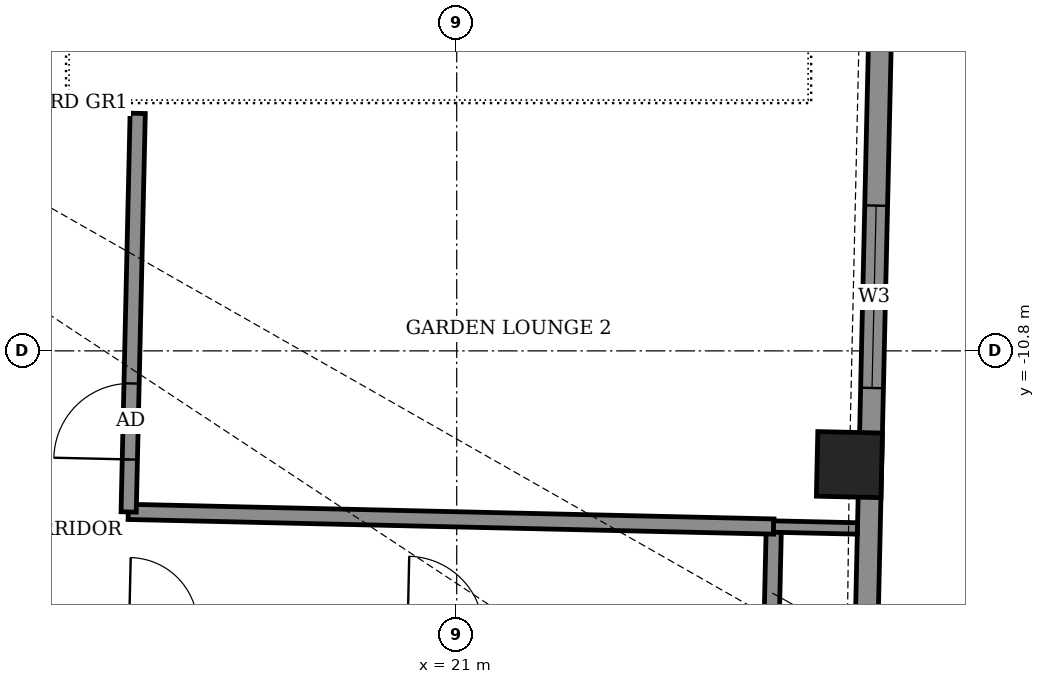
"""IFC4 building model, lengths in metres.
Left out: names, types, materials, properties, quantities, classifications, styles, units other than length and angle.
Written with IfcOpenShell. Run it as: python <this file> out.ifc"""

import sys

from ifc_helpers import new_model, si_unit, direction, frame, frame_2d, origin, origin_2d, place, context, subcontext, project, spatial, rectangle, extrude, element, fill, save


model = new_model("IFC4")
c1 = context("Model", 3, precision=1e-05, world=origin(), true_north=direction((0.0, 1.0)))
c2 = subcontext(c1, "Body", "Model", "MODEL_VIEW")
j1 = project(units=[si_unit("LENGTHUNIT", "METRE"), si_unit("PLANEANGLEUNIT", "RADIAN")], contexts=[c1])
p1 = place(None, origin())
s1 = spatial("IfcSite", under=j1, at=p1, CompositionType="ELEMENT")
p2 = place(p1, origin())
s2 = spatial("IfcBuilding", under=s1, at=p2, CompositionType="ELEMENT")
p3 = place(p2, frame((0.0, 0.0, 337.9)))
s3 = spatial("IfcBuildingStorey", under=s2, at=p3, CompositionType="ELEMENT", Elevation=337.9)
p4 = place(p3, frame((26.166, -12.296, -0.55), z_axis=(0.0, 0.0, 1.0), x_axis=(0.022679062841, 0.999742796978, 0.0)))
e1 = element("IfcColumn", 1, at=p4, inside=s3, PredefinedType="COLUMN", context=c2, shape_type="SweptSolid", body=[
    extrude(rectangle(XDim=0.85, YDim=0.85, at=origin_2d()), origin(), (0.0, 0.0, 1.0), 4.6),
])
p5 = place(p3, frame((26.379, -15.039, 0.0), z_axis=(0.0, 0.0, 1.0), x_axis=(0.022668695782, 0.9997430321, 0.0)))
e2 = element("IfcWall", 2, at=p5, inside=s3, PredefinedType="SOLIDWALL", context=c2, shape_type="SweptSolid", body=[
    extrude(rectangle(XDim=9.574, YDim=0.3, at=frame_2d((4.787, 0.0))), origin(), (0.0, 0.0, 1.0), 2.75),
])
p6 = place(p5, frame((3.752, 0.0, 0.9)))
e3 = element("IfcOpeningElement", 3, at=p6, cuts=e2, PredefinedType="OPENING", context=c2, shape_type="SweptSolid", body=[
    extrude(rectangle(XDim=2.4, YDim=1.8, at=frame_2d((1.2, 0.9))), frame((0.0, 0.16, 0.0), z_axis=(0.0, -1.0, 0.0), x_axis=(1.0, 0.0, 0.0)), (0.0, 0.0, 1.0), 0.32),
])
p7 = place(p3, frame((-23.849, -13.499, 0.0), z_axis=(0.0, 0.0, 1.0), x_axis=(0.999742429398, -0.022695260756, 0.0)))
e4 = element("IfcWall", 4, at=p7, inside=s3, PredefinedType="PARTITIONING", context=c2, shape_type="SweptSolid", body=[
    extrude(rectangle(XDim=49.0, YDim=0.2, at=frame_2d((24.5, 0.0))), origin(), (0.0, 0.0, 1.0), 2.45),
])
p8 = place(p7, frame((7.55, 0.0, 0.0)))
e5 = element("IfcOpeningElement", 5, at=p8, cuts=e4, PredefinedType="OPENING", context=c2, shape_type="SweptSolid", body=[
    extrude(rectangle(XDim=0.9, YDim=2.1, at=frame_2d((0.45, 1.05))), frame((0.0, 0.11, 0.0), z_axis=(0.0, -1.0, 0.0), x_axis=(1.0, 0.0, 0.0)), (0.0, 0.0, 1.0), 0.22),
])
p9 = place(p7, frame((12.794, 0.0, 0.0)))
e6 = element("IfcOpeningElement", 6, at=p9, cuts=e4, PredefinedType="OPENING", context=c2, shape_type="SweptSolid", body=[
    extrude(rectangle(XDim=1.0, YDim=2.1, at=frame_2d((0.5, 1.05))), frame((0.0, 0.11, 0.0), z_axis=(0.0, -1.0, 0.0), x_axis=(1.0, 0.0, 0.0)), (0.0, 0.0, 1.0), 0.22),
])
p10 = place(p7, frame((9.95, 0.0, 0.0)))
e7 = element("IfcOpeningElement", 7, at=p10, cuts=e4, PredefinedType="OPENING", context=c2, shape_type="SweptSolid", body=[
    extrude(rectangle(XDim=0.9, YDim=2.1, at=frame_2d((0.45, 1.05))), frame((0.0, 0.11, 0.0), z_axis=(0.0, -1.0, 0.0), x_axis=(1.0, 0.0, 0.0)), (0.0, 0.0, 1.0), 0.22),
])
p11 = place(p7, frame((17.45, 0.0, 0.0)))
e8 = element("IfcOpeningElement", 8, at=p11, cuts=e4, PredefinedType="OPENING", context=c2, shape_type="SweptSolid", body=[
    extrude(rectangle(XDim=1.0, YDim=2.1, at=frame_2d((0.5, 1.05))), frame((0.0, 0.11, 0.0), z_axis=(0.0, -1.0, 0.0), x_axis=(1.0, 0.0, 0.0)), (0.0, 0.0, 1.0), 0.22),
])
p12 = place(p7, frame((23.149, 0.0, 0.0)))
e9 = element("IfcOpeningElement", 9, at=p12, cuts=e4, PredefinedType="OPENING", context=c2, shape_type="SweptSolid", body=[
    extrude(rectangle(XDim=1.0, YDim=2.1, at=frame_2d((0.5, 1.05))), frame((0.0, 0.11, 0.0), z_axis=(0.0, -1.0, 0.0), x_axis=(1.0, 0.0, 0.0)), (0.0, 0.0, 1.0), 0.22),
])
p13 = place(p7, frame((29.1, 0.0, 0.0)))
e10 = element("IfcOpeningElement", 10, at=p13, cuts=e4, PredefinedType="OPENING", context=c2, shape_type="SweptSolid", body=[
    extrude(rectangle(XDim=1.0, YDim=2.1, at=frame_2d((0.5, 1.05))), frame((0.0, 0.11, 0.0), z_axis=(0.0, -1.0, 0.0), x_axis=(1.0, 0.0, 0.0)), (0.0, 0.0, 1.0), 0.22),
])
p14 = place(p7, frame((32.5, 0.0, 0.0)))
e11 = element("IfcOpeningElement", 11, at=p14, cuts=e4, PredefinedType="OPENING", context=c2, shape_type="SweptSolid", body=[
    extrude(rectangle(XDim=0.9, YDim=2.1, at=frame_2d((0.45, 1.05))), frame((0.0, 0.11, 0.0), z_axis=(0.0, -1.0, 0.0), x_axis=(1.0, 0.0, 0.0)), (0.0, 0.0, 1.0), 0.22),
])
p15 = place(p7, frame((37.5, 0.0, 0.0)))
e12 = element("IfcOpeningElement", 12, at=p15, cuts=e4, PredefinedType="OPENING", context=c2, shape_type="SweptSolid", body=[
    extrude(rectangle(XDim=1.0, YDim=2.1, at=frame_2d((0.5, 1.05))), frame((0.0, 0.11, 0.0), z_axis=(0.0, -1.0, 0.0), x_axis=(1.0, 0.0, 0.0)), (0.0, 0.0, 1.0), 0.22),
])
p16 = place(p7, frame((34.9, 0.0, 0.0)))
e13 = element("IfcOpeningElement", 13, at=p16, cuts=e4, PredefinedType="OPENING", context=c2, shape_type="SweptSolid", body=[
    extrude(rectangle(XDim=0.9, YDim=2.1, at=frame_2d((0.45, 1.05))), frame((0.0, 0.11, 0.0), z_axis=(0.0, -1.0, 0.0), x_axis=(1.0, 0.0, 0.0)), (0.0, 0.0, 1.0), 0.22),
])
p17 = place(p7, frame((44.213, 0.0, 0.0)))
e14 = element("IfcOpeningElement", 14, at=p17, cuts=e4, PredefinedType="OPENING", context=c2, shape_type="SweptSolid", body=[
    extrude(rectangle(XDim=1.0, YDim=2.1, at=frame_2d((0.5, 1.05))), frame((0.0, 0.11, 0.0), z_axis=(0.0, -1.0, 0.0), x_axis=(1.0, 0.0, 0.0)), (0.0, 0.0, 1.0), 0.22),
])
p18 = place(p7, frame((40.55, 0.0, 0.0)))
e15 = element("IfcOpeningElement", 15, at=p18, cuts=e4, PredefinedType="OPENING", context=c2, shape_type="SweptSolid", body=[
    extrude(rectangle(XDim=0.9, YDim=2.1, at=frame_2d((0.45, 1.05))), frame((0.0, 0.11, 0.0), z_axis=(0.0, -1.0, 0.0), x_axis=(1.0, 0.0, 0.0)), (0.0, 0.0, 1.0), 0.22),
])
p19 = place(p3, frame((25.132, -14.861, 0.0), z_axis=(0.0, 0.0, 1.0), x_axis=(0.02287347828, 0.99973836777, 0.0)))
e16 = element("IfcWall", 16, at=p19, inside=s3, PredefinedType="PARTITIONING", context=c2, shape_type="SweptSolid", body=[
    extrude(rectangle(XDim=1.75, YDim=0.2, at=frame_2d((0.875, 0.0))), origin(), (0.0, 0.0, 1.0), 2.75),
])
p20 = place(p3, frame((16.679, -12.918, 0.0), z_axis=(0.0, 0.0, 1.0), x_axis=(0.999741598108, -0.022731850181, 0.0)))
e17 = element("IfcWall", 17, at=p20, inside=s3, PredefinedType="PARTITIONING", context=c2, shape_type="SweptSolid", body=[
    extrude(rectangle(XDim=8.495, YDim=0.2, at=frame_2d((4.248, 0.0))), origin(), (0.0, 0.0, 1.0), 2.65),
])
p21 = place(p3, frame((16.684, -12.919, 0.0), z_axis=(0.0, 0.0, 1.0), x_axis=(0.022667483124, 0.999743059595, 0.0)))
e18 = element("IfcWall", 18, at=p21, inside=s3, PredefinedType="PARTITIONING", context=c2, shape_type="SweptSolid", body=[
    extrude(rectangle(XDim=5.245, YDim=0.2, at=frame_2d((2.623, 0.0))), origin(), (0.0, 0.0, 1.0), 2.65),
])
p22 = place(p21, frame((0.691, 0.0, 0.0)))
e19 = element("IfcOpeningElement", 19, at=p22, cuts=e18, PredefinedType="OPENING", context=c2, shape_type="SweptSolid", body=[
    extrude(rectangle(XDim=1.0, YDim=2.1, at=frame_2d((0.5, 1.05))), frame((0.0, 0.11, 0.0), z_axis=(0.0, -1.0, 0.0), x_axis=(1.0, 0.0, 0.0)), (0.0, 0.0, 1.0), 0.22),
])
p23 = place(p3, frame((25.168, -13.111, 0.0), z_axis=(0.0, 0.0, 1.0), x_axis=(0.999745701647, -0.022550654924, 0.0)))
e20 = element("IfcWall", 20, at=p23, inside=s3, PredefinedType="PARTITIONING", context=c2, shape_type="SweptSolid", body=[
    extrude(rectangle(XDim=1.104, YDim=0.15, at=frame_2d((0.552, 0.0))), origin(), (0.0, 0.0, 1.0), 2.75),
])
p24 = place(p6, origin())
e21 = element("IfcWindow", 21, at=p24, inside=s3, PartitioningType="DOUBLE_PANEL_VERTICAL", PredefinedType="WINDOW", context=c2, shape_type="SweptSolid", body=[
    extrude(rectangle(XDim=2.4, YDim=1.8, at=frame_2d((1.2, 0.9))), frame((0.0, 0.03, 0.0), z_axis=(0.0, -1.0, 0.0), x_axis=(1.0, 0.0, 0.0)), (0.0, 0.0, 1.0), 0.06),
])
fill(e3, e21)
p25 = place(p22, origin())
e22 = element("IfcDoor", 22, at=p25, inside=s3, OperationType="SINGLE_SWING_RIGHT", PredefinedType="DOOR", context=c2, shape_type="SweptSolid", body=[
    extrude(rectangle(XDim=1.0, YDim=2.1, at=frame_2d((0.5, 1.05))), frame((0.0, 0.025, 0.0), z_axis=(0.0, -1.0, 0.0), x_axis=(1.0, 0.0, 0.0)), (0.0, 0.0, 1.0), 0.05),
])
fill(e19, e22)
save(model, sys.argv[1])
